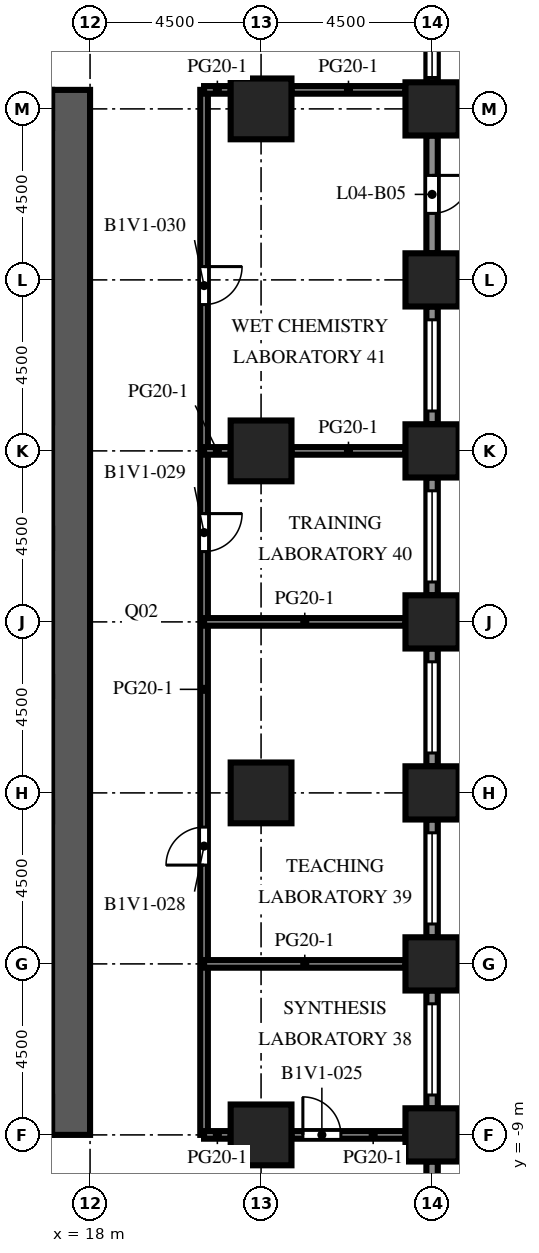
"""IFC4 building model, lengths in metres.
Left out: names, types, materials, properties, quantities, classifications, styles, units other than length and angle.
Written with IfcOpenShell. Run it as: python <this file> out.ifc"""

import sys

from ifc_helpers import new_model, si_unit, direction, frame, frame_2d, origin, origin_2d, place, context, subcontext, project, spatial, rectangle, extrude, element, fill, save


model = new_model("IFC4")
c1 = context("Model", 3, precision=1e-05, world=origin(), true_north=direction((0.0, 1.0)))
c2 = subcontext(c1, "Body", "Model", "MODEL_VIEW")
j1 = project(units=[si_unit("LENGTHUNIT", "METRE"), si_unit("PLANEANGLEUNIT", "RADIAN")], contexts=[c1])
p1 = place(None, origin())
s1 = spatial("IfcSite", under=j1, at=p1, CompositionType="ELEMENT")
p2 = place(p1, origin())
s2 = spatial("IfcBuilding", under=s1, at=p2, CompositionType="ELEMENT")
p3 = place(p2, frame((0.0, 0.0, 19.5)))
s3 = spatial("IfcBuildingStorey", under=s2, at=p3, CompositionType="ELEMENT", Elevation=19.5)
for number, where, z_axis, x_axis in (
    (1, (27.0, -9.0, 0.0), (0.0, 0.0, 1.0), (1.0, 0.0, 0.0)),
    (2, (27.0, -4.5, 0.0), (0.0, 0.0, 1.0), (1.0, 0.0, 0.0)),
    (3, (27.0, 0.0, 0.0), (0.0, 0.0, 1.0), (1.0, 0.0, 0.0)),
    (4, (27.0, 4.5, 0.0), (0.0, 0.0, 1.0), (1.0, 0.0, 0.0)),
    (5, (27.0, 9.0, 0.0), (0.0, 0.0, 1.0), (1.0, 0.0, 0.0)),
    (6, (27.0, 13.5, 0.0), (0.0, 0.0, 1.0), (1.0, 0.0, 0.0)),
    (7, (27.0, 18.0, 0.0), (0.0, 0.0, 1.0), (1.0, 0.0, 0.0)),
):
    element("IfcColumn", number, at=place(p3, frame(where, z_axis=z_axis, x_axis=x_axis)), inside=s3, PredefinedType="COLUMN", context=c2, shape_type="SweptSolid", body=[
        extrude(rectangle(XDim=1.4, YDim=1.4, at=origin_2d()), origin(), (0.0, 0.0, 1.0), 4.1),
    ])
for number, where, z_axis, x_axis in (
    (8, (22.5, -9.0, 0.0), (0.0, 0.0, 1.0), (1.0, 0.0, 0.0)),
    (9, (22.5, 0.0, 0.0), (0.0, 0.0, 1.0), (1.0, 0.0, 0.0)),
    (10, (22.5, 9.0, 0.0), (0.0, 0.0, 1.0), (1.0, 0.0, 0.0)),
    (11, (22.5, 18.0, 0.0), (0.0, 0.0, 1.0), (1.0, 0.0, 0.0)),
):
    element("IfcColumn", number, at=place(p3, frame(where, z_axis=z_axis, x_axis=x_axis)), inside=s3, PredefinedType="COLUMN", context=c2, shape_type="SweptSolid", body=[
        extrude(rectangle(XDim=1.6, YDim=1.6, at=origin_2d()), origin(), (0.0, 0.0, 1.0), 4.1),
    ])
p4 = place(p3, frame((17.5, -9.0, 0.0), z_axis=(0.0, 0.0, 1.0), x_axis=(0.0, 1.0, 0.0)))
e12 = element("IfcWall", 12, at=p4, inside=s3, PredefinedType="SHEAR", context=c2, shape_type="SweptSolid", body=[
    extrude(rectangle(XDim=27.5, YDim=1.0, at=frame_2d((13.75, 0.0))), origin(), (0.0, 0.0, 1.0), 4.1),
])
p5 = place(p4, frame((12.55, 0.0, 0.0)))
e13 = element("IfcOpeningElement", 13, at=p5, cuts=e12, PredefinedType="OPENING", context=c2, shape_type="SweptSolid", body=[
    extrude(rectangle(XDim=2.4, YDim=2.4, at=frame_2d((1.2, 1.2))), frame((0.0, 0.51, 0.0), z_axis=(0.0, -1.0, 0.0), x_axis=(1.0, 0.0, 0.0)), (0.0, 0.0, 1.0), 1.02),
])
p6 = place(p4, frame((6.825, 0.0, 0.0)))
e14 = element("IfcOpeningElement", 14, at=p6, cuts=e12, PredefinedType="OPENING", context=c2, shape_type="SweptSolid", body=[
    extrude(rectangle(XDim=1.2, YDim=2.1, at=frame_2d((0.6, 1.05))), frame((0.0, 0.51, 0.0), z_axis=(0.0, -1.0, 0.0), x_axis=(1.0, 0.0, 0.0)), (0.0, 0.0, 1.0), 1.02),
])
p7 = place(p4, frame((19.475, 0.0, 0.0)))
e15 = element("IfcOpeningElement", 15, at=p7, cuts=e12, PredefinedType="OPENING", context=c2, shape_type="SweptSolid", body=[
    extrude(rectangle(XDim=1.2, YDim=2.1, at=frame_2d((0.6, 1.05))), frame((0.0, 0.51, 0.0), z_axis=(0.0, -1.0, 0.0), x_axis=(1.0, 0.0, 0.0)), (0.0, 0.0, 1.0), 1.02),
])
p8 = place(p3, frame((27.0, -9.7, 0.0), z_axis=(0.0, 0.0, 1.0), x_axis=(0.0, -1.0, 0.0)))
e16 = element("IfcWall", 16, at=p8, inside=s3, PredefinedType="SOLIDWALL", context=c2, shape_type="SweptSolid", body=[
    extrude(rectangle(XDim=3.1, YDim=0.3, at=frame_2d((1.55, 0.0))), origin(), (0.0, 0.0, 1.0), 2.75),
])
p9 = place(p8, frame((0.475, 0.0, 0.8)))
e17 = element("IfcOpeningElement", 17, at=p9, cuts=e16, PredefinedType="OPENING", context=c2, shape_type="SweptSolid", body=[
    extrude(rectangle(XDim=1.2, YDim=1.7, at=frame_2d((0.6, 0.85))), frame((0.0, 0.16, 0.0), z_axis=(0.0, -1.0, 0.0), x_axis=(1.0, 0.0, 0.0)), (0.0, 0.0, 1.0), 0.32),
])
p10 = place(p3, frame((27.0, -5.2, 0.0), z_axis=(0.0, 0.0, 1.0), x_axis=(0.0, -1.0, 0.0)))
e18 = element("IfcWall", 18, at=p10, inside=s3, PredefinedType="SOLIDWALL", context=c2, shape_type="SweptSolid", body=[
    extrude(rectangle(XDim=3.1, YDim=0.3, at=frame_2d((1.55, 0.0))), origin(), (0.0, 0.0, 1.0), 2.75),
])
p11 = place(p10, frame((0.35, 0.0, 0.8)))
e19 = element("IfcOpeningElement", 19, at=p11, cuts=e18, PredefinedType="OPENING", context=c2, shape_type="SweptSolid", body=[
    extrude(rectangle(XDim=2.4, YDim=1.7, at=frame_2d((1.2, 0.85))), frame((0.0, 0.16, 0.0), z_axis=(0.0, -1.0, 0.0), x_axis=(1.0, 0.0, 0.0)), (0.0, 0.0, 1.0), 0.32),
])
p12 = place(p3, frame((27.0, -0.7, 0.0), z_axis=(0.0, 0.0, 1.0), x_axis=(0.0, -1.0, 0.0)))
e20 = element("IfcWall", 20, at=p12, inside=s3, PredefinedType="SOLIDWALL", context=c2, shape_type="SweptSolid", body=[
    extrude(rectangle(XDim=3.1, YDim=0.3, at=frame_2d((1.55, 0.0))), origin(), (0.0, 0.0, 1.0), 2.75),
])
p13 = place(p12, frame((0.35, 0.0, 0.8)))
e21 = element("IfcOpeningElement", 21, at=p13, cuts=e20, PredefinedType="OPENING", context=c2, shape_type="SweptSolid", body=[
    extrude(rectangle(XDim=2.4, YDim=1.7, at=frame_2d((1.2, 0.85))), frame((0.0, 0.16, 0.0), z_axis=(0.0, -1.0, 0.0), x_axis=(1.0, 0.0, 0.0)), (0.0, 0.0, 1.0), 0.32),
])
p14 = place(p3, frame((27.0, 3.8, 0.0), z_axis=(0.0, 0.0, 1.0), x_axis=(0.0, -1.0, 0.0)))
e22 = element("IfcWall", 22, at=p14, inside=s3, PredefinedType="SOLIDWALL", context=c2, shape_type="SweptSolid", body=[
    extrude(rectangle(XDim=3.1, YDim=0.3, at=frame_2d((1.55, 0.0))), origin(), (0.0, 0.0, 1.0), 2.75),
])
p15 = place(p14, frame((0.35, 0.0, 0.8)))
e23 = element("IfcOpeningElement", 23, at=p15, cuts=e22, PredefinedType="OPENING", context=c2, shape_type="SweptSolid", body=[
    extrude(rectangle(XDim=2.4, YDim=1.7, at=frame_2d((1.2, 0.85))), frame((0.0, 0.16, 0.0), z_axis=(0.0, -1.0, 0.0), x_axis=(1.0, 0.0, 0.0)), (0.0, 0.0, 1.0), 0.32),
])
p16 = place(p3, frame((27.0, 8.3, 0.0), z_axis=(0.0, 0.0, 1.0), x_axis=(0.0, -1.0, 0.0)))
e24 = element("IfcWall", 24, at=p16, inside=s3, PredefinedType="SOLIDWALL", context=c2, shape_type="SweptSolid", body=[
    extrude(rectangle(XDim=3.1, YDim=0.3, at=frame_2d((1.55, 0.0))), origin(), (0.0, 0.0, 1.0), 2.75),
])
p17 = place(p16, frame((0.35, 0.0, 0.8)))
e25 = element("IfcOpeningElement", 25, at=p17, cuts=e24, PredefinedType="OPENING", context=c2, shape_type="SweptSolid", body=[
    extrude(rectangle(XDim=2.4, YDim=1.7, at=frame_2d((1.2, 0.85))), frame((0.0, 0.16, 0.0), z_axis=(0.0, -1.0, 0.0), x_axis=(1.0, 0.0, 0.0)), (0.0, 0.0, 1.0), 0.32),
])
p18 = place(p3, frame((27.0, 12.8, 0.0), z_axis=(0.0, 0.0, 1.0), x_axis=(0.0, -1.0, 0.0)))
e26 = element("IfcWall", 26, at=p18, inside=s3, PredefinedType="SOLIDWALL", context=c2, shape_type="SweptSolid", body=[
    extrude(rectangle(XDim=3.1, YDim=0.3, at=frame_2d((1.55, 0.0))), origin(), (0.0, 0.0, 1.0), 2.75),
])
p19 = place(p18, frame((0.35, 0.0, 0.8)))
e27 = element("IfcOpeningElement", 27, at=p19, cuts=e26, PredefinedType="OPENING", context=c2, shape_type="SweptSolid", body=[
    extrude(rectangle(XDim=2.4, YDim=1.7, at=frame_2d((1.2, 0.85))), frame((0.0, 0.16, 0.0), z_axis=(0.0, -1.0, 0.0), x_axis=(1.0, 0.0, 0.0)), (0.0, 0.0, 1.0), 0.32),
])
p20 = place(p3, frame((27.0, 17.3, 0.0), z_axis=(0.0, 0.0, 1.0), x_axis=(0.0, -1.0, 0.0)))
e28 = element("IfcWall", 28, at=p20, inside=s3, PredefinedType="SOLIDWALL", context=c2, shape_type="SweptSolid", body=[
    extrude(rectangle(XDim=3.1, YDim=0.3, at=frame_2d((1.55, 0.0))), origin(), (0.0, 0.0, 1.0), 2.75),
])
p21 = place(p20, frame((1.05, 0.0, 0.0)))
e29 = element("IfcOpeningElement", 29, at=p21, cuts=e28, PredefinedType="OPENING", context=c2, shape_type="SweptSolid", body=[
    extrude(rectangle(XDim=1.0, YDim=2.2, at=frame_2d((0.5, 1.1))), frame((0.0, 0.16, 0.0), z_axis=(0.0, -1.0, 0.0), x_axis=(1.0, 0.0, 0.0)), (0.0, 0.0, 1.0), 0.32),
])
p22 = place(p3, frame((27.0, 21.8, 0.0), z_axis=(0.0, 0.0, 1.0), x_axis=(0.0, -1.0, 0.0)))
e30 = element("IfcWall", 30, at=p22, inside=s3, PredefinedType="SOLIDWALL", context=c2, shape_type="SweptSolid", body=[
    extrude(rectangle(XDim=3.1, YDim=0.3, at=frame_2d((1.55, 0.0))), origin(), (0.0, 0.0, 1.0), 2.75),
])
p23 = place(p22, frame((0.575, 0.0, 0.8)))
e31 = element("IfcOpeningElement", 31, at=p23, cuts=e30, PredefinedType="OPENING", context=c2, shape_type="SweptSolid", body=[
    extrude(rectangle(XDim=2.4, YDim=1.7, at=frame_2d((1.2, 0.85))), frame((0.0, 0.16, 0.0), z_axis=(0.0, -1.0, 0.0), x_axis=(1.0, 0.0, 0.0)), (0.0, 0.0, 1.0), 0.32),
])
p24 = place(p3, frame((21.0, 18.5, 0.0), z_axis=(0.0, 0.0, 1.0), x_axis=(0.0, -1.0, 0.0)))
e32 = element("IfcWall", 32, at=p24, inside=s3, PredefinedType="PARTITIONING", context=c2, shape_type="SweptSolid", body=[
    extrude(rectangle(XDim=27.5, YDim=0.2, at=frame_2d((13.75, 0.0))), origin(), (0.0, 0.0, 1.0), 3.65),
])
p25 = place(p24, frame((19.4, 0.0, 0.0)))
e33 = element("IfcOpeningElement", 33, at=p25, cuts=e32, PredefinedType="OPENING", context=c2, shape_type="SweptSolid", body=[
    extrude(rectangle(XDim=1.0, YDim=2.1, at=frame_2d((0.5, 1.05))), frame((0.0, 0.11, 0.0), z_axis=(0.0, -1.0, 0.0), x_axis=(1.0, 0.0, 0.0)), (0.0, 0.0, 1.0), 0.22),
])
p26 = place(p24, frame((11.15, 0.0, 0.0)))
e34 = element("IfcOpeningElement", 34, at=p26, cuts=e32, PredefinedType="OPENING", context=c2, shape_type="SweptSolid", body=[
    extrude(rectangle(XDim=1.0, YDim=2.1, at=frame_2d((0.5, 1.05))), frame((0.0, 0.11, 0.0), z_axis=(0.0, -1.0, 0.0), x_axis=(1.0, 0.0, 0.0)), (0.0, 0.0, 1.0), 0.22),
])
p27 = place(p24, frame((4.65, 0.0, 0.0)))
e35 = element("IfcOpeningElement", 35, at=p27, cuts=e32, PredefinedType="OPENING", context=c2, shape_type="SweptSolid", body=[
    extrude(rectangle(XDim=1.0, YDim=2.1, at=frame_2d((0.5, 1.05))), frame((0.0, 0.11, 0.0), z_axis=(0.0, -1.0, 0.0), x_axis=(1.0, 0.0, 0.0)), (0.0, 0.0, 1.0), 0.22),
])
p28 = place(p3, frame((21.0, -9.0, 0.0), z_axis=(0.0, 0.0, 1.0), x_axis=(1.0, 0.0, 0.0)))
e36 = element("IfcWall", 36, at=p28, inside=s3, PredefinedType="PARTITIONING", context=c2, shape_type="SweptSolid", body=[
    extrude(rectangle(XDim=0.7, YDim=0.2, at=frame_2d((0.35, 0.0))), origin(), (0.0, 0.0, 1.0), 3.65),
])
p29 = place(p3, frame((23.3, -9.0, 0.0), z_axis=(0.0, 0.0, 1.0), x_axis=(1.0, 0.0, 0.0)))
e37 = element("IfcWall", 37, at=p29, inside=s3, PredefinedType="PARTITIONING", context=c2, shape_type="SweptSolid", body=[
    extrude(rectangle(XDim=3.0, YDim=0.2, at=frame_2d((1.5, 0.0))), origin(), (0.0, 0.0, 1.0), 3.65),
])
p30 = place(p29, frame((0.3, 0.0, 0.0)))
e38 = element("IfcOpeningElement", 38, at=p30, cuts=e37, PredefinedType="OPENING", context=c2, shape_type="SweptSolid", body=[
    extrude(rectangle(XDim=1.0, YDim=2.1, at=frame_2d((0.5, 1.05))), frame((0.0, 0.11, 0.0), z_axis=(0.0, -1.0, 0.0), x_axis=(1.0, 0.0, 0.0)), (0.0, 0.0, 1.0), 0.22),
])
for number, where, z_axis, x_axis in (
    (39, (21.0, -4.5, 0.0), (0.0, 0.0, 1.0), (1.0, 0.0, 0.0)),
    (40, (21.0, 4.5, 0.0), (0.0, 0.0, 1.0), (1.0, 0.0, 0.0)),
):
    element("IfcWall", number, at=place(p3, frame(where, z_axis=z_axis, x_axis=x_axis)), inside=s3, PredefinedType="PARTITIONING", context=c2, shape_type="SweptSolid", body=[
        extrude(rectangle(XDim=5.3, YDim=0.2, at=frame_2d((2.65, 0.0))), origin(), (0.0, 0.0, 1.0), 3.65),
    ])
p31 = place(p3, frame((21.0, 9.0, 0.0), z_axis=(0.0, 0.0, 1.0), x_axis=(1.0, 0.0, 0.0)))
e41 = element("IfcWall", 41, at=p31, inside=s3, PredefinedType="PARTITIONING", context=c2, shape_type="SweptSolid", body=[
    extrude(rectangle(XDim=0.7, YDim=0.2, at=frame_2d((0.35, 0.0))), origin(), (0.0, 0.0, 1.0), 3.65),
])
p32 = place(p3, frame((23.3, 9.0, 0.0), z_axis=(0.0, 0.0, 1.0), x_axis=(1.0, 0.0, 0.0)))
e42 = element("IfcWall", 42, at=p32, inside=s3, PredefinedType="PARTITIONING", context=c2, shape_type="SweptSolid", body=[
    extrude(rectangle(XDim=3.0, YDim=0.2, at=frame_2d((1.5, 0.0))), origin(), (0.0, 0.0, 1.0), 3.65),
])
p33 = place(p3, frame((21.0, 18.5, 0.0), z_axis=(0.0, 0.0, 1.0), x_axis=(1.0, 0.0, 0.0)))
e43 = element("IfcWall", 43, at=p33, inside=s3, PredefinedType="PARTITIONING", context=c2, shape_type="SweptSolid", body=[
    extrude(rectangle(XDim=0.7, YDim=0.2, at=frame_2d((0.35, 0.0))), origin(), (0.0, 0.0, 1.0), 3.65),
])
p34 = place(p3, frame((23.3, 18.5, 0.0), z_axis=(0.0, 0.0, 1.0), x_axis=(1.0, 0.0, 0.0)))
e44 = element("IfcWall", 44, at=p34, inside=s3, PredefinedType="PARTITIONING", context=c2, shape_type="SweptSolid", body=[
    extrude(rectangle(XDim=3.0, YDim=0.2, at=frame_2d((1.5, 0.0))), origin(), (0.0, 0.0, 1.0), 3.65),
])
p35 = place(p11, origin())
e45 = element("IfcWindow", 45, at=p35, inside=s3, PartitioningType="SINGLE_PANEL", PredefinedType="WINDOW", context=c2, shape_type="SweptSolid", body=[
    extrude(rectangle(XDim=2.4, YDim=1.7, at=frame_2d((1.2, 0.85))), frame((0.0, 0.03, 0.0), z_axis=(0.0, -1.0, 0.0), x_axis=(1.0, 0.0, 0.0)), (0.0, 0.0, 1.0), 0.06),
])
fill(e19, e45)
p36 = place(p13, origin())
e46 = element("IfcWindow", 46, at=p36, inside=s3, PartitioningType="SINGLE_PANEL", PredefinedType="WINDOW", context=c2, shape_type="SweptSolid", body=[
    extrude(rectangle(XDim=2.4, YDim=1.7, at=frame_2d((1.2, 0.85))), frame((0.0, 0.03, 0.0), z_axis=(0.0, -1.0, 0.0), x_axis=(1.0, 0.0, 0.0)), (0.0, 0.0, 1.0), 0.06),
])
fill(e21, e46)
p37 = place(p15, origin())
e47 = element("IfcWindow", 47, at=p37, inside=s3, PartitioningType="SINGLE_PANEL", PredefinedType="WINDOW", context=c2, shape_type="SweptSolid", body=[
    extrude(rectangle(XDim=2.4, YDim=1.7, at=frame_2d((1.2, 0.85))), frame((0.0, 0.03, 0.0), z_axis=(0.0, -1.0, 0.0), x_axis=(1.0, 0.0, 0.0)), (0.0, 0.0, 1.0), 0.06),
])
fill(e23, e47)
p38 = place(p17, origin())
e48 = element("IfcWindow", 48, at=p38, inside=s3, PartitioningType="SINGLE_PANEL", PredefinedType="WINDOW", context=c2, shape_type="SweptSolid", body=[
    extrude(rectangle(XDim=2.4, YDim=1.7, at=frame_2d((1.2, 0.85))), frame((0.0, 0.03, 0.0), z_axis=(0.0, -1.0, 0.0), x_axis=(1.0, 0.0, 0.0)), (0.0, 0.0, 1.0), 0.06),
])
fill(e25, e48)
p39 = place(p19, origin())
e49 = element("IfcWindow", 49, at=p39, inside=s3, PartitioningType="SINGLE_PANEL", PredefinedType="WINDOW", context=c2, shape_type="SweptSolid", body=[
    extrude(rectangle(XDim=2.4, YDim=1.7, at=frame_2d((1.2, 0.85))), frame((0.0, 0.03, 0.0), z_axis=(0.0, -1.0, 0.0), x_axis=(1.0, 0.0, 0.0)), (0.0, 0.0, 1.0), 0.06),
])
fill(e27, e49)
p40 = place(p21, origin())
e50 = element("IfcDoor", 50, at=p40, inside=s3, OperationType="SINGLE_SWING_LEFT", PredefinedType="DOOR", context=c2, shape_type="SweptSolid", body=[
    extrude(rectangle(XDim=1.0, YDim=2.2, at=frame_2d((0.5, 1.1))), frame((0.0, 0.025, 0.0), z_axis=(0.0, -1.0, 0.0), x_axis=(1.0, 0.0, 0.0)), (0.0, 0.0, 1.0), 0.05),
])
fill(e29, e50)
p41 = place(p23, origin())
e51 = element("IfcWindow", 51, at=p41, inside=s3, PartitioningType="SINGLE_PANEL", PredefinedType="WINDOW", context=c2, shape_type="SweptSolid", body=[
    extrude(rectangle(XDim=2.4, YDim=1.7, at=frame_2d((1.2, 0.85))), frame((0.0, 0.03, 0.0), z_axis=(0.0, -1.0, 0.0), x_axis=(1.0, 0.0, 0.0)), (0.0, 0.0, 1.0), 0.06),
])
fill(e31, e51)
p42 = place(p5, origin())
e52 = element("IfcDoor", 52, at=p42, inside=s3, OperationType="DOUBLE_DOOR_DOUBLE_SWING", PredefinedType="DOOR", context=c2, shape_type="SweptSolid", body=[
    extrude(rectangle(XDim=2.4, YDim=2.4, at=frame_2d((1.2, 1.2))), frame((0.0, 0.025, 0.0), z_axis=(0.0, -1.0, 0.0), x_axis=(1.0, 0.0, 0.0)), (0.0, 0.0, 1.0), 0.05),
])
fill(e13, e52)
p43 = place(p6, frame((1.2, 0.0, 0.0), z_axis=(0.0, 0.0, 1.0), x_axis=(-1.0, 0.0, 0.0)))
e53 = element("IfcDoor", 53, at=p43, inside=s3, OperationType="SINGLE_SWING_LEFT", PredefinedType="DOOR", context=c2, shape_type="SweptSolid", body=[
    extrude(rectangle(XDim=1.2, YDim=2.1, at=frame_2d((0.6, 1.05))), frame((0.0, 0.025, 0.0), z_axis=(0.0, -1.0, 0.0), x_axis=(1.0, 0.0, 0.0)), (0.0, 0.0, 1.0), 0.05),
])
fill(e14, e53)
p44 = place(p7, frame((1.2, 0.0, 0.0), z_axis=(0.0, 0.0, 1.0), x_axis=(-1.0, 0.0, 0.0)))
e54 = element("IfcDoor", 54, at=p44, inside=s3, OperationType="SINGLE_SWING_LEFT", PredefinedType="DOOR", context=c2, shape_type="SweptSolid", body=[
    extrude(rectangle(XDim=1.2, YDim=2.1, at=frame_2d((0.6, 1.05))), frame((0.0, 0.025, 0.0), z_axis=(0.0, -1.0, 0.0), x_axis=(1.0, 0.0, 0.0)), (0.0, 0.0, 1.0), 0.05),
])
fill(e15, e54)
p45 = place(p30, origin())
e55 = element("IfcDoor", 55, at=p45, inside=s3, OperationType="SINGLE_SWING_LEFT", PredefinedType="DOOR", context=c2, shape_type="SweptSolid", body=[
    extrude(rectangle(XDim=1.0, YDim=2.1, at=frame_2d((0.5, 1.05))), frame((0.0, 0.025, 0.0), z_axis=(0.0, -1.0, 0.0), x_axis=(1.0, 0.0, 0.0)), (0.0, 0.0, 1.0), 0.05),
])
fill(e38, e55)
p46 = place(p25, origin())
e56 = element("IfcDoor", 56, at=p46, inside=s3, OperationType="SINGLE_SWING_RIGHT", PredefinedType="DOOR", context=c2, shape_type="SweptSolid", body=[
    extrude(rectangle(XDim=1.0, YDim=2.1, at=frame_2d((0.5, 1.05))), frame((0.0, 0.025, 0.0), z_axis=(0.0, -1.0, 0.0), x_axis=(1.0, 0.0, 0.0)), (0.0, 0.0, 1.0), 0.05),
])
fill(e33, e56)
p47 = place(p26, origin())
e57 = element("IfcDoor", 57, at=p47, inside=s3, OperationType="SINGLE_SWING_LEFT", PredefinedType="DOOR", context=c2, shape_type="SweptSolid", body=[
    extrude(rectangle(XDim=1.0, YDim=2.1, at=frame_2d((0.5, 1.05))), frame((0.0, 0.025, 0.0), z_axis=(0.0, -1.0, 0.0), x_axis=(1.0, 0.0, 0.0)), (0.0, 0.0, 1.0), 0.05),
])
fill(e34, e57)
p48 = place(p27, origin())
e58 = element("IfcDoor", 58, at=p48, inside=s3, OperationType="SINGLE_SWING_LEFT", PredefinedType="DOOR", context=c2, shape_type="SweptSolid", body=[
    extrude(rectangle(XDim=1.0, YDim=2.1, at=frame_2d((0.5, 1.05))), frame((0.0, 0.025, 0.0), z_axis=(0.0, -1.0, 0.0), x_axis=(1.0, 0.0, 0.0)), (0.0, 0.0, 1.0), 0.05),
])
fill(e35, e58)
save(model, sys.argv[1])
